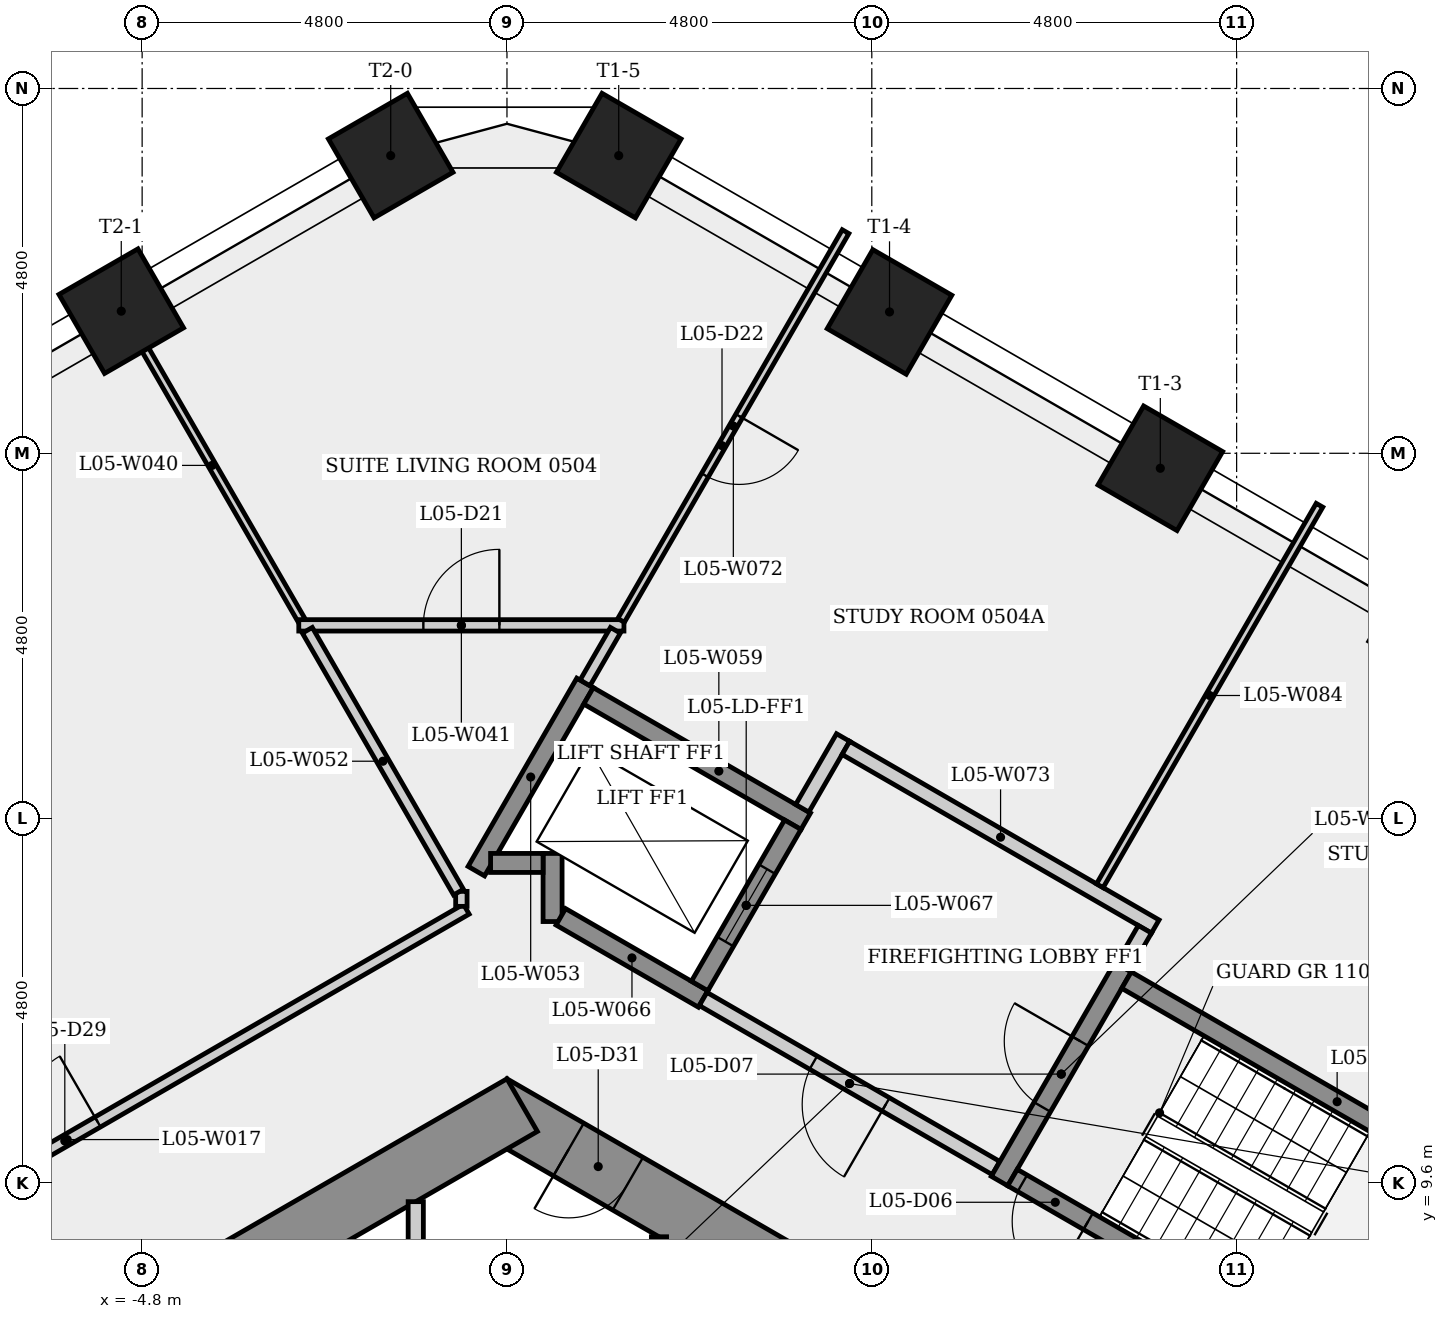
"""IFC4 building model, lengths in metres.
Left out: names, types, materials, properties, quantities, classifications, styles, units other than length and angle.
Written with IfcOpenShell. Run it as: python <this file> out.ifc"""

import sys

from ifc_helpers import new_model, si_unit, direction, frame, frame_2d, origin, origin_2d, place, context, subcontext, project, spatial, rectangle, extrude, element, fill, save


model = new_model("IFC4")
c1 = context("Model", 3, precision=1e-05, world=origin(), true_north=direction((0.0, 1.0)))
c2 = subcontext(c1, "Body", "Model", "MODEL_VIEW")
j1 = project(units=[si_unit("LENGTHUNIT", "METRE"), si_unit("PLANEANGLEUNIT", "RADIAN")], contexts=[c1])
p1 = place(None, origin())
s1 = spatial("IfcSite", under=j1, at=p1, CompositionType="ELEMENT")
p2 = place(p1, origin())
s2 = spatial("IfcBuilding", under=s1, at=p2, CompositionType="ELEMENT")
p3 = place(p2, frame((0.0, 0.0, 25.5)))
s3 = spatial("IfcBuildingStorey", under=s2, at=p3, CompositionType="ELEMENT", Elevation=25.5)
p4 = place(p3, frame((9.3, 5.138, 0.0), z_axis=(0.0, 0.0, 1.0), x_axis=(-0.866023993627, 0.500002442456, 0.0)))
e1 = element("IfcWall", 1, at=p4, inside=s3, PredefinedType="SHEAR", context=c2, shape_type="SweptSolid", body=[
    extrude(rectangle(XDim=10.97, YDim=0.8, at=frame_2d((5.485, 0.0))), origin(), (0.0, 0.0, 1.0), 3.4),
])
p5 = place(p4, frame((8.903, 0.0, 0.0)))
e2 = element("IfcOpeningElement", 2, at=p5, cuts=e1, PredefinedType="OPENING", context=c2, shape_type="SweptSolid", body=[
    extrude(rectangle(XDim=0.9, YDim=2.1, at=frame_2d((0.45, 1.05))), frame((0.0, 0.41, 0.0), z_axis=(0.0, -1.0, 0.0), x_axis=(1.0, 0.0, 0.0)), (0.0, 0.0, 1.0), 0.82),
])
p6 = place(p4, frame((2.269, 0.0, 0.0)))
e3 = element("IfcOpeningElement", 3, at=p6, cuts=e1, PredefinedType="OPENING", context=c2, shape_type="SweptSolid", body=[
    extrude(rectangle(XDim=0.9, YDim=2.1, at=frame_2d((0.45, 1.05))), frame((0.0, 0.41, 0.0), z_axis=(0.0, -1.0, 0.0), x_axis=(1.0, 0.0, 0.0)), (0.0, 0.0, 1.0), 0.82),
])
p7 = place(p3, frame((0.2, 10.623, 0.0), z_axis=(0.0, 0.0, 1.0), x_axis=(-0.866023993627, -0.500002442456, 0.0)))
e4 = element("IfcWall", 4, at=p7, inside=s3, PredefinedType="SHEAR", context=c2, shape_type="SweptSolid", body=[
    extrude(rectangle(XDim=10.97, YDim=0.8, at=frame_2d((5.485, 0.0))), origin(), (0.0, 0.0, 1.0), 3.4),
])
p8 = place(p7, frame((7.339, 0.0, 0.0)))
e5 = element("IfcOpeningElement", 5, at=p8, cuts=e4, PredefinedType="OPENING", context=c2, shape_type="SweptSolid", body=[
    extrude(rectangle(XDim=0.9, YDim=2.1, at=frame_2d((0.45, 1.05))), frame((0.0, 0.41, 0.0), z_axis=(0.0, -1.0, 0.0), x_axis=(1.0, 0.0, 0.0)), (0.0, 0.0, 1.0), 0.82),
])
for number, where, z_axis, x_axis in (
    (6, (8.596, 19.003, 0.0), (0.0, 0.0, 1.0), (0.5, 0.866, 0.0)),
    (7, (5.033, 21.06, 0.0), (0.0, 0.0, 1.0), (0.5, 0.866, 0.0)),
    (8, (1.47, 23.117, 0.0), (0.0, 0.0, 1.0), (0.5, 0.866, 0.0)),
    (9, (-1.53, 23.117, 0.0), (0.0, 0.0, 1.0), (-0.5, 0.866, 0.0)),
    (10, (-5.075, 21.07, 0.0), (0.0, 0.0, 1.0), (-0.5, 0.866, 0.0)),
):
    element("IfcColumn", number, at=place(p3, frame(where, z_axis=z_axis, x_axis=x_axis)), inside=s3, PredefinedType="COLUMN", context=c2, shape_type="SweptSolid", body=[
        extrude(rectangle(XDim=1.2, YDim=1.2, at=origin_2d()), origin(), (0.0, 0.0, 1.0), 3.4),
    ])
p9 = place(p3, frame((-11.035, 7.139, 0.0), z_axis=(0.0, 0.0, 1.0), x_axis=(0.866022616891, 0.50000482701, 0.0)))
e11 = element("IfcWall", 11, at=p9, inside=s3, PredefinedType="PARTITIONING", context=c2, shape_type="SweptSolid", body=[
    extrude(rectangle(XDim=12.125, YDim=0.15, at=frame_2d((6.062, 0.0))), origin(), (0.0, 0.0, 1.0), 3.05),
])
p10 = place(p9, frame((5.525, 0.0, 0.0)))
e12 = element("IfcOpeningElement", 12, at=p10, cuts=e11, PredefinedType="OPENING", context=c2, shape_type="SweptSolid", body=[
    extrude(rectangle(XDim=1.0, YDim=2.1, at=frame_2d((0.5, 1.05))), frame((0.0, 0.085, 0.0), z_axis=(0.0, -1.0, 0.0), x_axis=(1.0, 0.0, 0.0)), (0.0, 0.0, 1.0), 0.17),
])
p11 = place(p3, frame((-2.702, 17.001, 0.0), z_axis=(0.0, 0.0, 1.0), x_axis=(-0.500002112793, 0.866024183959, 0.0)))
e13 = element("IfcWall", 13, at=p11, inside=s3, PredefinedType="PARTITIONING", context=c2, shape_type="SweptSolid", body=[
    extrude(rectangle(XDim=4.71, YDim=0.1, at=frame_2d((2.355, 0.0))), origin(), (0.0, 0.0, 1.0), 3.05),
])
p12 = place(p3, frame((-2.739, 16.936, 0.0), z_axis=(0.0, 0.0, 1.0), x_axis=(1.0, 0.0, 0.0)))
e14 = element("IfcWall", 14, at=p12, inside=s3, PredefinedType="PARTITIONING", context=c2, shape_type="SweptSolid", body=[
    extrude(rectangle(XDim=4.278, YDim=0.15, at=frame_2d((2.139, 0.0))), origin(), (0.0, 0.0, 1.0), 3.05),
])
p13 = place(p12, frame((1.639, 0.0, 0.0)))
e15 = element("IfcOpeningElement", 15, at=p13, cuts=e14, PredefinedType="OPENING", context=c2, shape_type="SweptSolid", body=[
    extrude(rectangle(XDim=1.0, YDim=2.1, at=frame_2d((0.5, 1.05))), frame((0.0, 0.085, 0.0), z_axis=(0.0, -1.0, 0.0), x_axis=(1.0, 0.0, 0.0)), (0.0, 0.0, 1.0), 0.17),
])
p14 = place(p3, frame((-1.2, 9.353, 0.0), z_axis=(0.0, 0.0, 1.0), x_axis=(0.0, -1.0, 0.0)))
e16 = element("IfcWall", 16, at=p14, inside=s3, PredefinedType="PARTITIONING", context=c2, shape_type="SweptSolid", body=[
    extrude(rectangle(XDim=4.078, YDim=0.2, at=frame_2d((2.039, 0.0))), origin(), (0.0, 0.0, 1.0), 3.05),
])
p15 = place(p3, frame((-0.6, 13.239, 0.0), z_axis=(0.0, 0.0, 1.0), x_axis=(0.0, 1.0, 0.0)))
e17 = element("IfcWall", 17, at=p15, inside=s3, PredefinedType="PARTITIONING", context=c2, shape_type="SweptSolid", body=[
    extrude(rectangle(XDim=0.197, YDim=0.15, at=frame_2d((0.099, 0.0))), origin(), (0.0, 0.0, 1.0), 3.05),
])
p16 = place(p3, frame((-0.637, 13.426, 0.0), z_axis=(0.0, 0.0, 1.0), x_axis=(-0.500046503579, 0.865998553266, 0.0)))
e18 = element("IfcWall", 18, at=p16, inside=s3, PredefinedType="PARTITIONING", context=c2, shape_type="SweptSolid", body=[
    extrude(rectangle(XDim=3.978, YDim=0.15, at=frame_2d((1.989, 0.0))), origin(), (0.0, 0.0, 1.0), 3.05),
])
p17 = place(p3, frame((-0.403, 13.702, 0.0), z_axis=(0.0, 0.0, 1.0), x_axis=(0.499976111731, 0.866039195244, 0.0)))
e19 = element("IfcWall", 19, at=p17, inside=s3, PredefinedType="SHEAR", context=c2, shape_type="SweptSolid", body=[
    extrude(rectangle(XDim=2.861, YDim=0.25, at=frame_2d((1.43, 0.0))), origin(), (0.0, 0.0, 1.0), 3.05),
])
p18 = place(p3, frame((0.6, 13.039, 0.0), z_axis=(0.0, 0.0, 1.0), x_axis=(0.0, 1.0, 0.0)))
e20 = element("IfcWall", 20, at=p18, inside=s3, PredefinedType="SHEAR", context=c2, shape_type="SweptSolid", body=[
    extrude(rectangle(XDim=0.896, YDim=0.25, at=frame_2d((0.448, 0.0))), origin(), (0.0, 0.0, 1.0), 3.05),
])
p19 = place(p3, frame((0.475, 13.81, 0.0), z_axis=(0.0, 0.0, 1.0), x_axis=(-1.0, 0.0, 0.0)))
e21 = element("IfcWall", 21, at=p19, inside=s3, PredefinedType="SHEAR", context=c2, shape_type="SweptSolid", body=[
    extrude(rectangle(XDim=0.691, YDim=0.25, at=frame_2d((0.345, 0.0))), origin(), (0.0, 0.0, 1.0), 3.4),
])
p20 = place(p3, frame((1.073, 16.008, 0.0), z_axis=(0.0, 0.0, 1.0), x_axis=(0.866040211805, -0.499974350878, 0.0)))
e22 = element("IfcWall", 22, at=p20, inside=s3, PredefinedType="SHEAR", context=c2, shape_type="SweptSolid", body=[
    extrude(rectangle(XDim=3.3, YDim=0.25, at=frame_2d((1.65, 0.0))), origin(), (0.0, 0.0, 1.0), 3.05),
])
p21 = place(p3, frame((1.427, 16.871, 0.0), z_axis=(0.0, 0.0, 1.0), x_axis=(-0.499951716245, -0.866053278629, 0.0)))
e23 = element("IfcWall", 23, at=p21, inside=s3, PredefinedType="PARTITIONING", context=c2, shape_type="SweptSolid", body=[
    extrude(rectangle(XDim=0.799, YDim=0.15, at=frame_2d((0.399, 0.0))), origin(), (0.0, 0.0, 1.0), 3.05),
])
p22 = place(p3, frame((2.0, 8.891, 0.0), z_axis=(0.0, 0.0, 1.0), x_axis=(0.0, -1.0, 0.0)))
e24 = element("IfcWall", 24, at=p22, inside=s3, PredefinedType="PARTITIONING", context=c2, shape_type="SweptSolid", body=[
    extrude(rectangle(XDim=3.616, YDim=0.2, at=frame_2d((1.808, 0.0))), origin(), (0.0, 0.0, 1.0), 3.05),
])
p23 = place(p3, frame((2.581, 12.02, 0.0), z_axis=(0.0, 0.0, 1.0), x_axis=(-0.86603892542, 0.499976579108, 0.0)))
e25 = element("IfcWall", 25, at=p23, inside=s3, PredefinedType="SHEAR", context=c2, shape_type="SweptSolid", body=[
    extrude(rectangle(XDim=2.162, YDim=0.25, at=frame_2d((1.081, 0.0))), origin(), (0.0, 0.0, 1.0), 3.05),
])
p24 = place(p3, frame((2.535, 12.191, 0.0), z_axis=(0.0, 0.0, 1.0), x_axis=(0.500061746146, 0.865989751695, 0.0)))
e26 = element("IfcWall", 26, at=p24, inside=s3, PredefinedType="SHEAR", context=c2, shape_type="SweptSolid", body=[
    extrude(rectangle(XDim=2.45, YDim=0.25, at=frame_2d((1.225, 0.0))), origin(), (0.0, 0.0, 1.0), 3.4),
])
p25 = place(p24, frame((0.675, 0.0, 0.0)))
e27 = element("IfcOpeningElement", 27, at=p25, cuts=e26, PredefinedType="OPENING", context=c2, shape_type="SweptSolid", body=[
    extrude(rectangle(XDim=1.1, YDim=2.1, at=frame_2d((0.55, 1.05))), frame((0.0, 0.135, 0.0), z_axis=(0.0, -1.0, 0.0), x_axis=(1.0, 0.0, 0.0)), (0.0, 0.0, 1.0), 0.27),
])
p26 = place(p3, frame((3.885, 14.529, 0.0), z_axis=(0.0, 0.0, 1.0), x_axis=(0.499997628298, 0.866026773083, 0.0)))
e28 = element("IfcWall", 28, at=p26, inside=s3, PredefinedType="PARTITIONING", context=c2, shape_type="SweptSolid", body=[
    extrude(rectangle(XDim=1.075, YDim=0.2, at=frame_2d((0.538, 0.0))), origin(), (0.0, 0.0, 1.0), 3.05),
])
p27 = place(p3, frame((4.455, 22.116, 0.0), z_axis=(0.0, 0.0, 1.0), x_axis=(-0.499980071345, -0.866036909293, 0.0)))
e29 = element("IfcWall", 29, at=p27, inside=s3, PredefinedType="PARTITIONING", context=c2, shape_type="SweptSolid", body=[
    extrude(rectangle(XDim=5.906, YDim=0.1, at=frame_2d((2.953, 0.0))), origin(), (0.0, 0.0, 1.0), 3.05),
])
p28 = place(p27, frame((2.801, 0.0, 0.0)))
e30 = element("IfcOpeningElement", 30, at=p28, cuts=e29, PredefinedType="OPENING", context=c2, shape_type="SweptSolid", body=[
    extrude(rectangle(XDim=0.9, YDim=2.1, at=frame_2d((0.45, 1.05))), frame((0.0, 0.06, 0.0), z_axis=(0.0, -1.0, 0.0), x_axis=(1.0, 0.0, 0.0)), (0.0, 0.0, 1.0), 0.12),
])
p29 = place(p3, frame((4.459, 15.323, 0.0), z_axis=(0.0, 0.0, 1.0), x_axis=(0.866016039709, -0.500016218704, 0.0)))
e31 = element("IfcWall", 31, at=p29, inside=s3, PredefinedType="PARTITIONING", context=c2, shape_type="SweptSolid", body=[
    extrude(rectangle(XDim=4.7, YDim=0.2, at=frame_2d((2.35, 0.0))), origin(), (0.0, 0.0, 1.0), 3.05),
])
p30 = place(p3, frame((6.435, 9.795, 0.0), z_axis=(0.0, 0.0, 1.0), x_axis=(-0.866012907634, 0.500021643343, 0.0)))
e32 = element("IfcWall", 32, at=p30, inside=s3, PredefinedType="PARTITIONING", context=c2, shape_type="SweptSolid", body=[
    extrude(rectangle(XDim=4.45, YDim=0.2, at=frame_2d((2.225, 0.0))), origin(), (0.0, 0.0, 1.0), 3.05),
])
p31 = place(p30, frame((1.675, 0.0, 0.0)))
e33 = element("IfcOpeningElement", 33, at=p31, cuts=e32, PredefinedType="OPENING", context=c2, shape_type="SweptSolid", body=[
    extrude(rectangle(XDim=1.1, YDim=2.1, at=frame_2d((0.55, 1.05))), frame((0.0, 0.11, 0.0), z_axis=(0.0, -1.0, 0.0), x_axis=(1.0, 0.0, 0.0)), (0.0, 0.0, 1.0), 0.22),
])
p32 = place(p3, frame((6.48, 9.624, 0.0), z_axis=(0.0, 0.0, 1.0), x_axis=(0.500017246033, 0.866015446554, 0.0)))
e34 = element("IfcWall", 34, at=p32, inside=s3, PredefinedType="SHEAR", context=c2, shape_type="SweptSolid", body=[
    extrude(rectangle(XDim=3.25, YDim=0.25, at=frame_2d((1.625, 0.0))), origin(), (0.0, 0.0, 1.0), 3.05),
])
p33 = place(p32, frame((1.125, 0.0, 0.0)))
e35 = element("IfcOpeningElement", 35, at=p33, cuts=e34, PredefinedType="OPENING", context=c2, shape_type="SweptSolid", body=[
    extrude(rectangle(XDim=1.0, YDim=2.1, at=frame_2d((0.5, 1.05))), frame((0.0, 0.135, 0.0), z_axis=(0.0, -1.0, 0.0), x_axis=(1.0, 0.0, 0.0)), (0.0, 0.0, 1.0), 0.27),
])
p34 = place(p3, frame((7.8, 13.51, 0.0), z_axis=(0.0, 0.0, 1.0), x_axis=(0.499982030767, 0.866035778077, 0.0)))
e36 = element("IfcWall", 36, at=p34, inside=s3, PredefinedType="PARTITIONING", context=c2, shape_type="SweptSolid", body=[
    extrude(rectangle(XDim=5.781, YDim=0.1, at=frame_2d((2.89, 0.0))), origin(), (0.0, 0.0, 1.0), 3.05),
])
p35 = place(p3, frame((8.151, 12.268, 0.0), z_axis=(0.0, 0.0, 1.0), x_axis=(0.866025499775, -0.499999833739, 0.0)))
e37 = element("IfcWall", 37, at=p35, inside=s3, PredefinedType="SHEAR", context=c2, shape_type="SweptSolid", body=[
    extrude(rectangle(XDim=6.4, YDim=0.25, at=frame_2d((3.2, 0.0))), origin(), (0.0, 0.0, 1.0), 3.05),
])
p36 = place(p3, frame((8.393, 12.937, 0.0), z_axis=(0.0, 0.0, 1.0), x_axis=(-0.500065409566, -0.86598763626, 0.0)))
e38 = element("IfcWall", 38, at=p36, inside=s3, PredefinedType="PARTITIONING", context=c2, shape_type="SweptSolid", body=[
    extrude(rectangle(XDim=0.575, YDim=0.2, at=frame_2d((0.288, 0.0))), origin(), (0.0, 0.0, 1.0), 3.05),
])
p37 = place(p3, frame((12.194, 6.47, 0.0), z_axis=(0.0, 0.0, 1.0), x_axis=(-0.866025499775, 0.499999833739, 0.0)))
e39 = element("IfcWall", 39, at=p37, inside=s3, PredefinedType="SHEAR", context=c2, shape_type="SweptSolid", body=[
    extrude(rectangle(XDim=6.4, YDim=0.25, at=frame_2d((3.2, 0.0))), origin(), (0.0, 0.0, 1.0), 3.05),
])
p38 = place(p37, frame((5.25, 0.0, 0.0)))
e40 = element("IfcOpeningElement", 40, at=p38, cuts=e39, PredefinedType="OPENING", context=c2, shape_type="SweptSolid", body=[
    extrude(rectangle(XDim=1.0, YDim=2.1, at=frame_2d((0.5, 1.05))), frame((0.0, 0.135, 0.0), z_axis=(0.0, -1.0, 0.0), x_axis=(1.0, 0.0, 0.0)), (0.0, 0.0, 1.0), 0.27),
])
p39 = place(p38, origin())
e41 = element("IfcDoor", 41, at=p39, inside=s3, OperationType="SINGLE_SWING_LEFT", PredefinedType="DOOR", context=c2, shape_type="SweptSolid", body=[
    extrude(rectangle(XDim=1.0, YDim=2.1, at=frame_2d((0.5, 1.05))), frame((0.0, 0.025, 0.0), z_axis=(0.0, -1.0, 0.0), x_axis=(1.0, 0.0, 0.0)), (0.0, 0.0, 1.0), 0.05),
])
fill(e40, e41)
p40 = place(p33, origin())
e42 = element("IfcDoor", 42, at=p40, inside=s3, OperationType="SINGLE_SWING_RIGHT", PredefinedType="DOOR", context=c2, shape_type="SweptSolid", body=[
    extrude(rectangle(XDim=1.0, YDim=2.1, at=frame_2d((0.5, 1.05))), frame((0.0, 0.025, 0.0), z_axis=(0.0, -1.0, 0.0), x_axis=(1.0, 0.0, 0.0)), (0.0, 0.0, 1.0), 0.05),
])
fill(e35, e42)
p41 = place(p31, origin())
e43 = element("IfcDoor", 43, at=p41, inside=s3, OperationType="SINGLE_SWING_LEFT", PredefinedType="DOOR", context=c2, shape_type="SweptSolid", body=[
    extrude(rectangle(XDim=1.1, YDim=2.1, at=frame_2d((0.55, 1.05))), frame((0.0, 0.025, 0.0), z_axis=(0.0, -1.0, 0.0), x_axis=(1.0, 0.0, 0.0)), (0.0, 0.0, 1.0), 0.05),
])
fill(e33, e43)
p42 = place(p25, origin())
e44 = element("IfcDoor", 44, at=p42, inside=s3, OperationType="SLIDING_TO_LEFT", PredefinedType="DOOR", context=c2, shape_type="SweptSolid", body=[
    extrude(rectangle(XDim=1.1, YDim=2.1, at=frame_2d((0.55, 1.05))), frame((0.0, 0.025, 0.0), z_axis=(0.0, -1.0, 0.0), x_axis=(1.0, 0.0, 0.0)), (0.0, 0.0, 1.0), 0.05),
])
fill(e27, e44)
p43 = place(p13, origin())
e45 = element("IfcDoor", 45, at=p43, inside=s3, OperationType="SINGLE_SWING_RIGHT", PredefinedType="DOOR", context=c2, shape_type="SweptSolid", body=[
    extrude(rectangle(XDim=1.0, YDim=2.1, at=frame_2d((0.5, 1.05))), frame((0.0, 0.025, 0.0), z_axis=(0.0, -1.0, 0.0), x_axis=(1.0, 0.0, 0.0)), (0.0, 0.0, 1.0), 0.05),
])
fill(e15, e45)
p44 = place(p28, origin())
e46 = element("IfcDoor", 46, at=p44, inside=s3, OperationType="SINGLE_SWING_LEFT", PredefinedType="DOOR", context=c2, shape_type="SweptSolid", body=[
    extrude(rectangle(XDim=0.9, YDim=2.1, at=frame_2d((0.45, 1.05))), frame((0.0, 0.025, 0.0), z_axis=(0.0, -1.0, 0.0), x_axis=(1.0, 0.0, 0.0)), (0.0, 0.0, 1.0), 0.05),
])
fill(e30, e46)
p45 = place(p10, origin())
e47 = element("IfcDoor", 47, at=p45, inside=s3, OperationType="SINGLE_SWING_RIGHT", PredefinedType="DOOR", context=c2, shape_type="SweptSolid", body=[
    extrude(rectangle(XDim=1.0, YDim=2.1, at=frame_2d((0.5, 1.05))), frame((0.0, 0.025, 0.0), z_axis=(0.0, -1.0, 0.0), x_axis=(1.0, 0.0, 0.0)), (0.0, 0.0, 1.0), 0.05),
])
fill(e12, e47)
p46 = place(p5, origin())
e48 = element("IfcDoor", 48, at=p46, inside=s3, OperationType="SINGLE_SWING_RIGHT", PredefinedType="DOOR", context=c2, shape_type="SweptSolid", body=[
    extrude(rectangle(XDim=0.9, YDim=2.1, at=frame_2d((0.45, 1.05))), frame((0.0, 0.025, 0.0), z_axis=(0.0, -1.0, 0.0), x_axis=(1.0, 0.0, 0.0)), (0.0, 0.0, 1.0), 0.05),
])
fill(e2, e48)
save(model, sys.argv[1])
